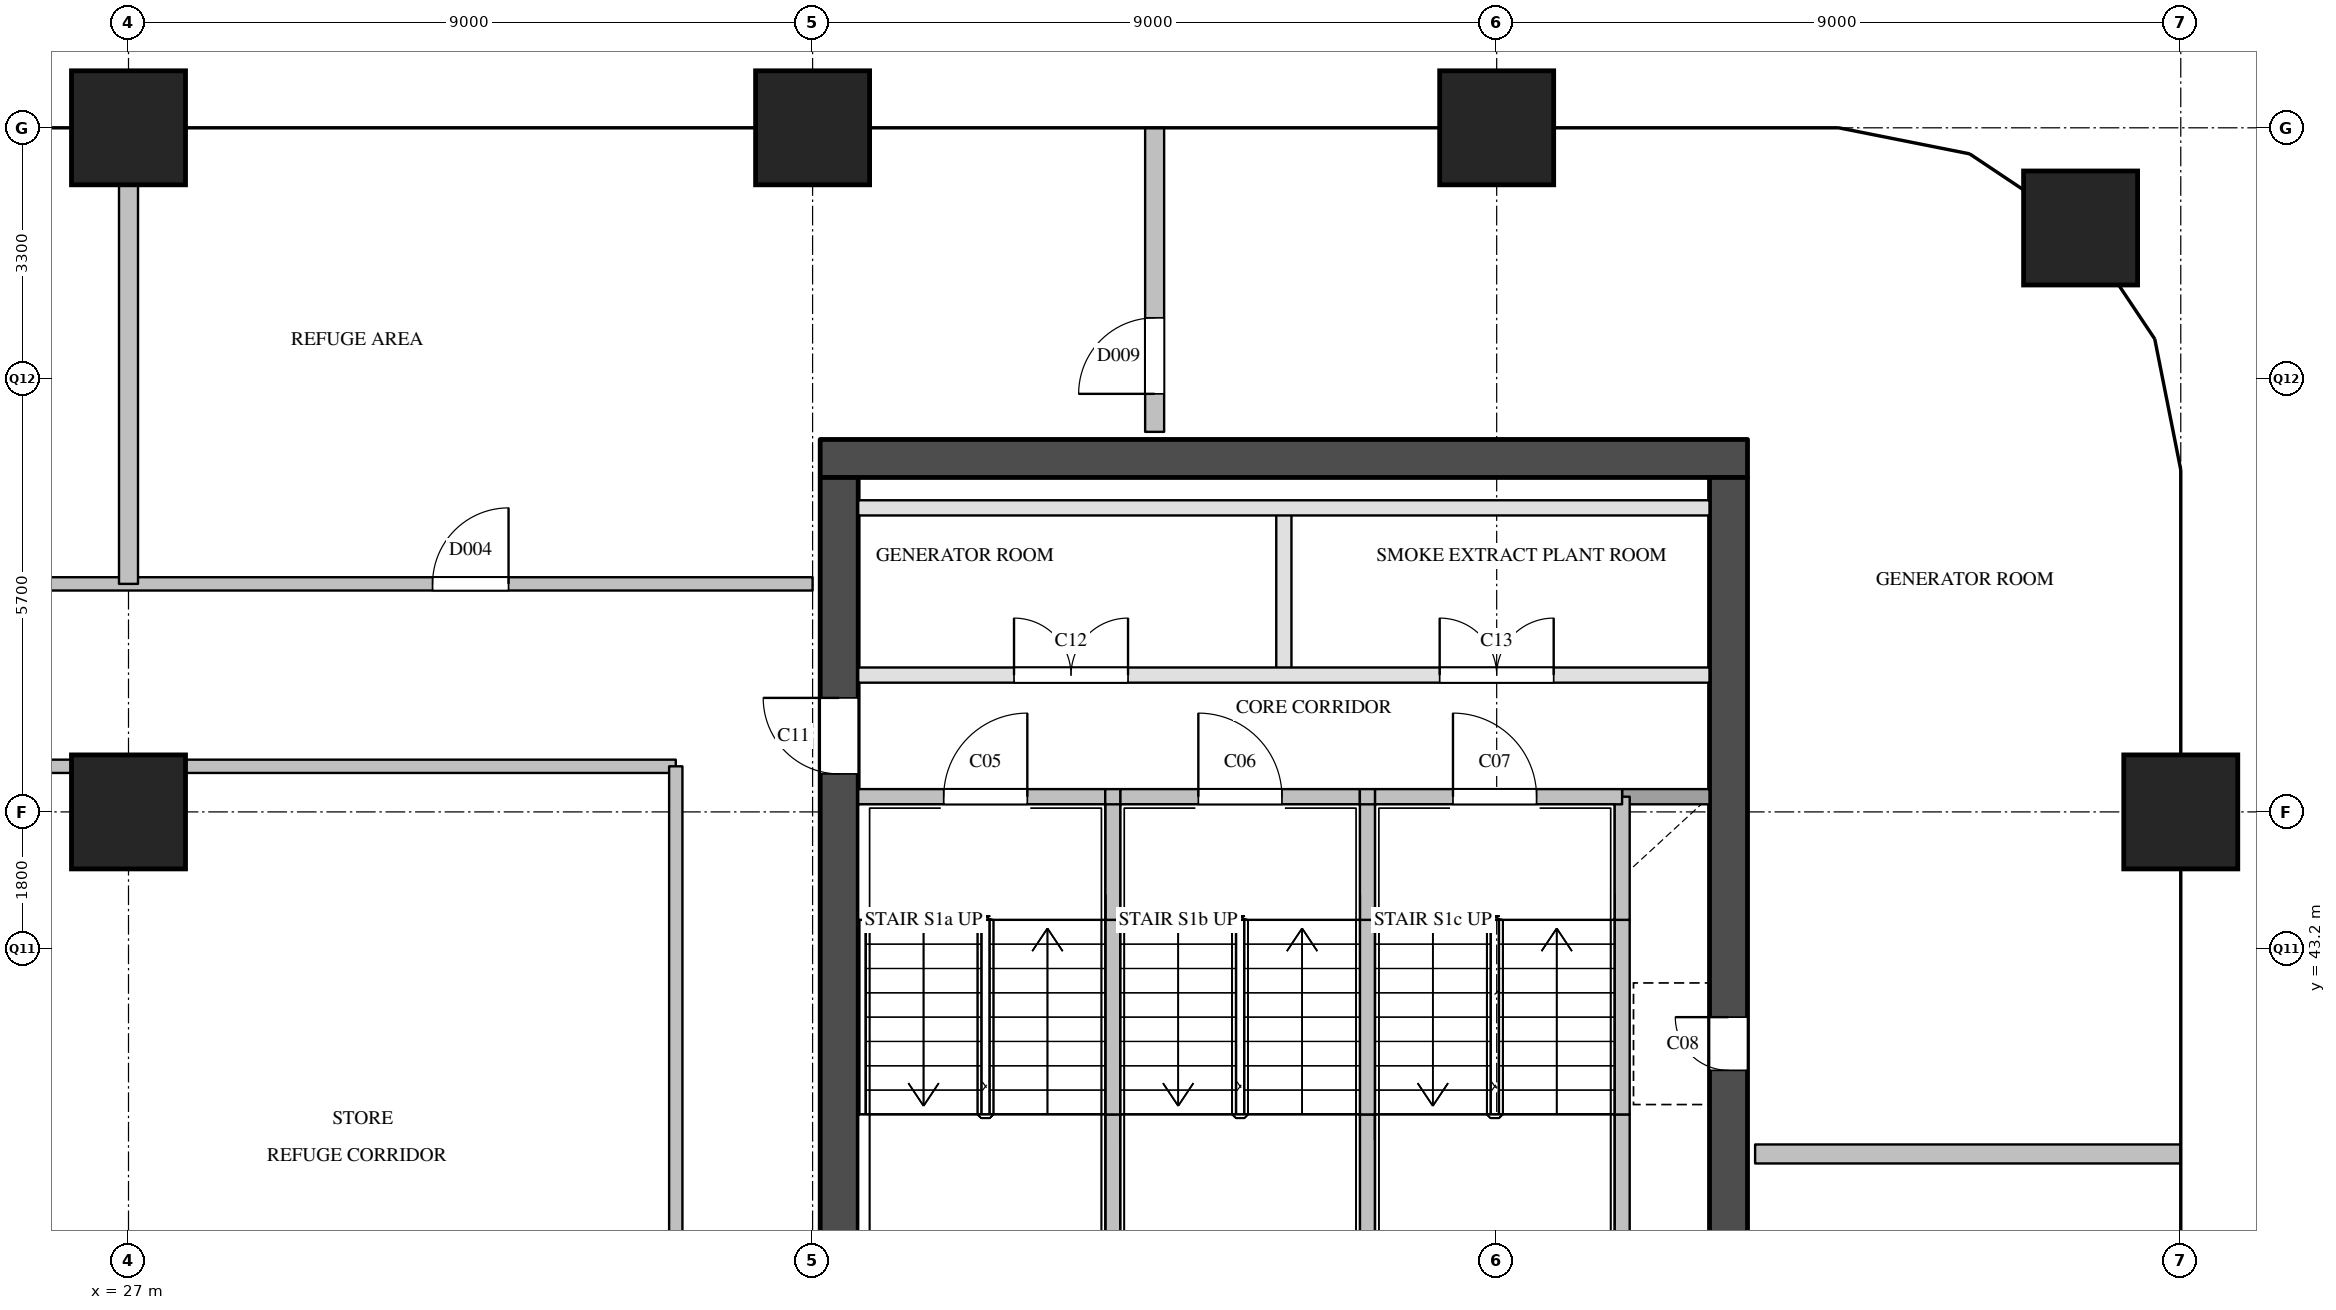
"""IFC4 building model, lengths in metres.
Left out: names, types, materials, properties, quantities, classifications, styles, units other than length and angle.
Written with IfcOpenShell. Run it as: python <this file> out.ifc"""

import sys

from ifc_helpers import new_model, si_unit, direction, frame, frame_2d, origin, origin_2d, place, context, subcontext, project, spatial, rectangle, extrude, element, fill, save


model = new_model("IFC4")
c1 = context("Model", 3, precision=1e-05, world=origin(), true_north=direction((0.0, 1.0)))
c2 = subcontext(c1, "Body", "Model", "MODEL_VIEW")
j1 = project(units=[si_unit("LENGTHUNIT", "METRE"), si_unit("PLANEANGLEUNIT", "RADIAN")], contexts=[c1])
p1 = place(None, origin())
s1 = spatial("IfcSite", under=j1, at=p1, CompositionType="ELEMENT")
p2 = place(p1, origin())
s2 = spatial("IfcBuilding", under=s1, at=p2, CompositionType="ELEMENT")
p3 = place(p2, frame((0.0, 0.0, 197.3)))
s3 = spatial("IfcBuildingStorey", under=s2, at=p3, CompositionType="ELEMENT", Elevation=197.3)
for number, where, z_axis, x_axis in (
    (1, (27.0, 45.0, 0.0), (0.0, 0.0, 1.0), (1.0, 0.0, 0.0)),
    (2, (27.0, 54.0, 0.0), (0.0, 0.0, 1.0), (1.0, 0.0, 0.0)),
    (3, (36.0, 54.0, 0.0), (0.0, 0.0, 1.0), (1.0, 0.0, 0.0)),
    (4, (45.0, 54.0, 0.0), (0.0, 0.0, 1.0), (1.0, 0.0, 0.0)),
    (5, (54.0, 45.0, 0.0), (0.0, 0.0, 1.0), (1.0, 0.0, 0.0)),
    (6, (52.682, 52.682, 0.0), (0.0, 0.0, 1.0), (1.0, 0.0, 0.0)),
):
    element("IfcColumn", number, at=place(p3, frame(where, z_axis=z_axis, x_axis=x_axis)), inside=s3, PredefinedType="COLUMN", context=c2, shape_type="SweptSolid", body=[
        extrude(rectangle(XDim=1.5, YDim=1.5, at=origin_2d()), origin(), (0.0, 0.0, 1.0), 6.0),
    ])
p4 = place(p3, frame((36.1, 49.65, 0.0), z_axis=(0.0, 0.0, 1.0), x_axis=(1.0, 0.0, 0.0)))
e7 = element("IfcWall", 7, at=p4, inside=s3, PredefinedType="SHEAR", context=c2, shape_type="SweptSolid", body=[
    extrude(rectangle(XDim=12.2, YDim=0.5, at=frame_2d((6.1, 0.0))), origin(), (0.0, 0.0, 1.0), 5.7),
])
p5 = place(p3, frame((36.35, 29.1, 0.0), z_axis=(0.0, 0.0, 1.0), x_axis=(0.0, 1.0, 0.0)))
e8 = element("IfcWall", 8, at=p5, inside=s3, PredefinedType="SHEAR", context=c2, shape_type="SweptSolid", body=[
    extrude(rectangle(XDim=20.3, YDim=0.5, at=frame_2d((10.15, 0.0))), origin(), (0.0, 0.0, 1.0), 5.7),
])
p6 = place(p5, frame((3.6, 0.0, 0.0)))
e9 = element("IfcOpeningElement", 9, at=p6, cuts=e8, PredefinedType="OPENING", context=c2, shape_type="SweptSolid", body=[
    extrude(rectangle(XDim=1.8, YDim=2.1, at=frame_2d((0.9, 1.05))), frame((0.0, 0.26, 0.0), z_axis=(0.0, -1.0, 0.0), x_axis=(1.0, 0.0, 0.0)), (0.0, 0.0, 1.0), 0.52),
])
p7 = place(p5, frame((16.4, 0.0, 0.0)))
e10 = element("IfcOpeningElement", 10, at=p7, cuts=e8, PredefinedType="OPENING", context=c2, shape_type="SweptSolid", body=[
    extrude(rectangle(XDim=1.0, YDim=2.1, at=frame_2d((0.5, 1.05))), frame((0.0, 0.26, 0.0), z_axis=(0.0, -1.0, 0.0), x_axis=(1.0, 0.0, 0.0)), (0.0, 0.0, 1.0), 0.52),
])
p8 = place(p3, frame((48.05, 29.1, 0.0), z_axis=(0.0, 0.0, 1.0), x_axis=(0.0, 1.0, 0.0)))
e11 = element("IfcWall", 11, at=p8, inside=s3, PredefinedType="SHEAR", context=c2, shape_type="SweptSolid", body=[
    extrude(rectangle(XDim=20.3, YDim=0.5, at=frame_2d((10.15, 0.0))), origin(), (0.0, 0.0, 1.0), 5.7),
])
p9 = place(p8, frame((12.5, 0.0, 0.0)))
e12 = element("IfcOpeningElement", 12, at=p9, cuts=e11, PredefinedType="OPENING", context=c2, shape_type="SweptSolid", body=[
    extrude(rectangle(XDim=0.7, YDim=2.1, at=frame_2d((0.35, 1.05))), frame((0.0, 0.26, 0.0), z_axis=(0.0, -1.0, 0.0), x_axis=(1.0, 0.0, 0.0)), (0.0, 0.0, 1.0), 0.52),
])
p10 = place(p3, frame((39.95, 39.0, 0.0), z_axis=(0.0, 0.0, 1.0), x_axis=(0.0, 1.0, 0.0)))
e13 = element("IfcWall", 13, at=p10, inside=s3, PredefinedType="SOLIDWALL", context=c2, shape_type="SweptSolid", body=[
    extrude(rectangle(XDim=2.02, YDim=0.2, at=frame_2d((1.01, 0.0))), origin(), (0.0, 0.0, 1.0), 5.7),
])
p11 = place(p3, frame((39.95, 41.02, 0.0), z_axis=(0.0, 0.0, 1.0), x_axis=(0.0, 1.0, 0.0)))
e14 = element("IfcWall", 14, at=p11, inside=s3, PredefinedType="SOLIDWALL", context=c2, shape_type="SweptSolid", body=[
    extrude(rectangle(XDim=2.56, YDim=0.2, at=frame_2d((1.28, 0.0))), origin(), (0.0, 0.0, 1.0), 5.7),
])
p12 = place(p3, frame((39.95, 43.58, 0.0), z_axis=(0.0, 0.0, 1.0), x_axis=(0.0, 1.0, 0.0)))
e15 = element("IfcWall", 15, at=p12, inside=s3, PredefinedType="SOLIDWALL", context=c2, shape_type="SweptSolid", body=[
    extrude(rectangle(XDim=1.62, YDim=0.2, at=frame_2d((0.81, 0.0))), origin(), (0.0, 0.0, 1.0), 5.7),
])
p13 = place(p3, frame((42.2, 46.8, 0.0), z_axis=(0.0, 0.0, 1.0), x_axis=(0.0, 1.0, 0.0)))
e16 = element("IfcWall", 16, at=p13, inside=s3, PredefinedType="PARTITIONING", context=c2, shape_type="SweptSolid", body=[
    extrude(rectangle(XDim=2.2, YDim=0.2, at=frame_2d((1.1, 0.0))), origin(), (0.0, 0.0, 1.0), 5.7),
])
p14 = place(p3, frame((43.3, 39.0, 0.0), z_axis=(0.0, 0.0, 1.0), x_axis=(0.0, 1.0, 0.0)))
e17 = element("IfcWall", 17, at=p14, inside=s3, PredefinedType="SOLIDWALL", context=c2, shape_type="SweptSolid", body=[
    extrude(rectangle(XDim=2.02, YDim=0.2, at=frame_2d((1.01, 0.0))), origin(), (0.0, 0.0, 1.0), 5.7),
])
p15 = place(p3, frame((43.3, 41.02, 0.0), z_axis=(0.0, 0.0, 1.0), x_axis=(0.0, 1.0, 0.0)))
e18 = element("IfcWall", 18, at=p15, inside=s3, PredefinedType="SOLIDWALL", context=c2, shape_type="SweptSolid", body=[
    extrude(rectangle(XDim=2.56, YDim=0.2, at=frame_2d((1.28, 0.0))), origin(), (0.0, 0.0, 1.0), 5.7),
])
p16 = place(p3, frame((43.3, 43.58, 0.0), z_axis=(0.0, 0.0, 1.0), x_axis=(0.0, 1.0, 0.0)))
e19 = element("IfcWall", 19, at=p16, inside=s3, PredefinedType="SOLIDWALL", context=c2, shape_type="SweptSolid", body=[
    extrude(rectangle(XDim=1.62, YDim=0.2, at=frame_2d((0.81, 0.0))), origin(), (0.0, 0.0, 1.0), 5.7),
])
p17 = place(p3, frame((46.65, 39.0, 0.0), z_axis=(0.0, 0.0, 1.0), x_axis=(0.0, 1.0, 0.0)))
e20 = element("IfcWall", 20, at=p17, inside=s3, PredefinedType="SOLIDWALL", context=c2, shape_type="SweptSolid", body=[
    extrude(rectangle(XDim=2.02, YDim=0.2, at=frame_2d((1.01, 0.0))), origin(), (0.0, 0.0, 1.0), 5.7),
])
p18 = place(p3, frame((46.65, 41.02, 0.0), z_axis=(0.0, 0.0, 1.0), x_axis=(0.0, 1.0, 0.0)))
e21 = element("IfcWall", 21, at=p18, inside=s3, PredefinedType="SOLIDWALL", context=c2, shape_type="SweptSolid", body=[
    extrude(rectangle(XDim=2.56, YDim=0.2, at=frame_2d((1.28, 0.0))), origin(), (0.0, 0.0, 1.0), 5.7),
])
p19 = place(p3, frame((46.65, 43.58, 0.0), z_axis=(0.0, 0.0, 1.0), x_axis=(0.0, 1.0, 0.0)))
e22 = element("IfcWall", 22, at=p19, inside=s3, PredefinedType="SOLIDWALL", context=c2, shape_type="SweptSolid", body=[
    extrude(rectangle(XDim=1.62, YDim=0.2, at=frame_2d((0.81, 0.0))), origin(), (0.0, 0.0, 1.0), 5.7),
])
p20 = place(p3, frame((46.65, 45.2, 0.0), z_axis=(0.0, 0.0, 1.0), x_axis=(1.0, 0.0, 0.0)))
e23 = element("IfcWall", 23, at=p20, inside=s3, PredefinedType="SOLIDWALL", context=c2, shape_type="SweptSolid", body=[
    extrude(rectangle(XDim=1.15, YDim=0.2, at=frame_2d((0.575, 0.0))), origin(), (0.0, 0.0, 1.0), 5.7),
])
p21 = place(p3, frame((36.6, 45.2, 0.0), z_axis=(0.0, 0.0, 1.0), x_axis=(1.0, 0.0, 0.0)))
e24 = element("IfcWall", 24, at=p21, inside=s3, PredefinedType="SOLIDWALL", context=c2, shape_type="SweptSolid", body=[
    extrude(rectangle(XDim=3.25, YDim=0.2, at=frame_2d((1.625, 0.0))), origin(), (0.0, 0.0, 1.0), 5.7),
])
p22 = place(p21, frame((1.125, 0.0, 0.0)))
e25 = element("IfcOpeningElement", 25, at=p22, cuts=e24, PredefinedType="OPENING", context=c2, shape_type="SweptSolid", body=[
    extrude(rectangle(XDim=1.1, YDim=2.1, at=frame_2d((0.55, 1.05))), frame((0.0, 0.11, 0.0), z_axis=(0.0, -1.0, 0.0), x_axis=(1.0, 0.0, 0.0)), (0.0, 0.0, 1.0), 0.22),
])
p23 = place(p3, frame((39.85, 45.2, 0.0), z_axis=(0.0, 0.0, 1.0), x_axis=(1.0, 0.0, 0.0)))
e26 = element("IfcWall", 26, at=p23, inside=s3, PredefinedType="SOLIDWALL", context=c2, shape_type="SweptSolid", body=[
    extrude(rectangle(XDim=0.2, YDim=0.2, at=frame_2d((0.1, 0.0))), origin(), (0.0, 0.0, 1.0), 5.7),
])
p24 = place(p3, frame((40.05, 45.2, 0.0), z_axis=(0.0, 0.0, 1.0), x_axis=(1.0, 0.0, 0.0)))
e27 = element("IfcWall", 27, at=p24, inside=s3, PredefinedType="SOLIDWALL", context=c2, shape_type="SweptSolid", body=[
    extrude(rectangle(XDim=3.15, YDim=0.2, at=frame_2d((1.575, 0.0))), origin(), (0.0, 0.0, 1.0), 5.7),
])
p25 = place(p24, frame((1.025, 0.0, 0.0)))
e28 = element("IfcOpeningElement", 28, at=p25, cuts=e27, PredefinedType="OPENING", context=c2, shape_type="SweptSolid", body=[
    extrude(rectangle(XDim=1.1, YDim=2.1, at=frame_2d((0.55, 1.05))), frame((0.0, 0.11, 0.0), z_axis=(0.0, -1.0, 0.0), x_axis=(1.0, 0.0, 0.0)), (0.0, 0.0, 1.0), 0.22),
])
p26 = place(p3, frame((43.2, 45.2, 0.0), z_axis=(0.0, 0.0, 1.0), x_axis=(1.0, 0.0, 0.0)))
e29 = element("IfcWall", 29, at=p26, inside=s3, PredefinedType="SOLIDWALL", context=c2, shape_type="SweptSolid", body=[
    extrude(rectangle(XDim=0.2, YDim=0.2, at=frame_2d((0.1, 0.0))), origin(), (0.0, 0.0, 1.0), 5.7),
])
p27 = place(p3, frame((43.4, 45.2, 0.0), z_axis=(0.0, 0.0, 1.0), x_axis=(1.0, 0.0, 0.0)))
e30 = element("IfcWall", 30, at=p27, inside=s3, PredefinedType="SOLIDWALL", context=c2, shape_type="SweptSolid", body=[
    extrude(rectangle(XDim=3.25, YDim=0.2, at=frame_2d((1.625, 0.0))), origin(), (0.0, 0.0, 1.0), 5.7),
])
p28 = place(p27, frame((1.025, 0.0, 0.0)))
e31 = element("IfcOpeningElement", 31, at=p28, cuts=e30, PredefinedType="OPENING", context=c2, shape_type="SweptSolid", body=[
    extrude(rectangle(XDim=1.1, YDim=2.1, at=frame_2d((0.55, 1.05))), frame((0.0, 0.11, 0.0), z_axis=(0.0, -1.0, 0.0), x_axis=(1.0, 0.0, 0.0)), (0.0, 0.0, 1.0), 0.22),
])
p29 = place(p3, frame((36.6, 46.8, 0.0), z_axis=(0.0, 0.0, 1.0), x_axis=(1.0, 0.0, 0.0)))
e32 = element("IfcWall", 32, at=p29, inside=s3, PredefinedType="PARTITIONING", context=c2, shape_type="SweptSolid", body=[
    extrude(rectangle(XDim=11.2, YDim=0.2, at=frame_2d((5.6, 0.0))), origin(), (0.0, 0.0, 1.0), 5.7),
])
p30 = place(p29, frame((2.05, 0.0, 0.0)))
e33 = element("IfcOpeningElement", 33, at=p30, cuts=e32, PredefinedType="OPENING", context=c2, shape_type="SweptSolid", body=[
    extrude(rectangle(XDim=1.5, YDim=2.1, at=frame_2d((0.75, 1.05))), frame((0.0, 0.11, 0.0), z_axis=(0.0, -1.0, 0.0), x_axis=(1.0, 0.0, 0.0)), (0.0, 0.0, 1.0), 0.22),
])
p31 = place(p29, frame((7.65, 0.0, 0.0)))
e34 = element("IfcOpeningElement", 34, at=p31, cuts=e32, PredefinedType="OPENING", context=c2, shape_type="SweptSolid", body=[
    extrude(rectangle(XDim=1.5, YDim=2.1, at=frame_2d((0.75, 1.05))), frame((0.0, 0.11, 0.0), z_axis=(0.0, -1.0, 0.0), x_axis=(1.0, 0.0, 0.0)), (0.0, 0.0, 1.0), 0.22),
])
p32 = place(p3, frame((36.6, 49.0, 0.0), z_axis=(0.0, 0.0, 1.0), x_axis=(1.0, 0.0, 0.0)))
e35 = element("IfcWall", 35, at=p32, inside=s3, PredefinedType="PARTITIONING", context=c2, shape_type="SweptSolid", body=[
    extrude(rectangle(XDim=11.2, YDim=0.2, at=frame_2d((5.6, 0.0))), origin(), (0.0, 0.0, 1.0), 5.7),
])
p33 = place(p3, frame((19.8, 45.6, 0.0), z_axis=(0.0, 0.0, 1.0), x_axis=(1.0, 0.0, 0.0)))
e36 = element("IfcWall", 36, at=p33, inside=s3, PredefinedType="PARTITIONING", context=c2, shape_type="SweptSolid", body=[
    extrude(rectangle(XDim=14.4, YDim=0.175, at=frame_2d((7.2, 0.0))), origin(), (0.0, 0.0, 1.0), 5.7),
])
p34 = place(p3, frame((18.0, 48.0, 0.0), z_axis=(0.0, 0.0, 1.0), x_axis=(1.0, 0.0, 0.0)))
e37 = element("IfcWall", 37, at=p34, inside=s3, PredefinedType="PARTITIONING", context=c2, shape_type="SweptSolid", body=[
    extrude(rectangle(XDim=18.0, YDim=0.175, at=frame_2d((9.0, 0.0))), origin(), (0.0, 0.0, 1.0), 5.7),
])
p35 = place(p34, frame((4.0, 0.0, 0.0)))
e38 = element("IfcOpeningElement", 38, at=p35, cuts=e37, PredefinedType="OPENING", context=c2, shape_type="SweptSolid", body=[
    extrude(rectangle(XDim=1.0, YDim=2.1, at=frame_2d((0.5, 1.05))), frame((0.0, 0.097, 0.0), z_axis=(0.0, -1.0, 0.0), x_axis=(1.0, 0.0, 0.0)), (0.0, 0.0, 1.0), 0.195),
])
p36 = place(p34, frame((13.0, 0.0, 0.0)))
e39 = element("IfcOpeningElement", 39, at=p36, cuts=e37, PredefinedType="OPENING", context=c2, shape_type="SweptSolid", body=[
    extrude(rectangle(XDim=1.0, YDim=2.1, at=frame_2d((0.5, 1.05))), frame((0.0, 0.097, 0.0), z_axis=(0.0, -1.0, 0.0), x_axis=(1.0, 0.0, 0.0)), (0.0, 0.0, 1.0), 0.195),
])
p37 = place(p3, frame((34.2, 35.4, 0.0), z_axis=(0.0, 0.0, 1.0), x_axis=(0.0, 1.0, 0.0)))
e40 = element("IfcWall", 40, at=p37, inside=s3, PredefinedType="PARTITIONING", context=c2, shape_type="SweptSolid", body=[
    extrude(rectangle(XDim=10.2, YDim=0.175, at=frame_2d((5.1, 0.0))), origin(), (0.0, 0.0, 1.0), 4.59),
])
p38 = place(p3, frame((48.4, 40.5, 0.0), z_axis=(0.0, 0.0, 1.0), x_axis=(1.0, 0.0, 0.0)))
e41 = element("IfcWall", 41, at=p38, inside=s3, PredefinedType="PARTITIONING", context=c2, shape_type="SweptSolid", body=[
    extrude(rectangle(XDim=5.6, YDim=0.25, at=frame_2d((2.8, 0.0))), origin(), (0.0, 0.0, 1.0), 5.7),
])
p39 = place(p3, frame((27.0, 48.0, 0.0), z_axis=(0.0, 0.0, 1.0), x_axis=(0.0, 1.0, 0.0)))
e42 = element("IfcWall", 42, at=p39, inside=s3, PredefinedType="PARTITIONING", context=c2, shape_type="SweptSolid", body=[
    extrude(rectangle(XDim=6.0, YDim=0.25, at=frame_2d((3.0, 0.0))), origin(), (0.0, 0.0, 1.0), 5.7),
])
p40 = place(p3, frame((40.5, 50.0, 0.0), z_axis=(0.0, 0.0, 1.0), x_axis=(0.0, 1.0, 0.0)))
e43 = element("IfcWall", 43, at=p40, inside=s3, PredefinedType="PARTITIONING", context=c2, shape_type="SweptSolid", body=[
    extrude(rectangle(XDim=4.0, YDim=0.25, at=frame_2d((2.0, 0.0))), origin(), (0.0, 0.0, 1.0), 5.7),
])
p41 = place(p40, frame((0.5, 0.0, 0.0)))
e44 = element("IfcOpeningElement", 44, at=p41, cuts=e43, PredefinedType="OPENING", context=c2, shape_type="SweptSolid", body=[
    extrude(rectangle(XDim=1.0, YDim=2.1, at=frame_2d((0.5, 1.05))), frame((0.0, 0.135, 0.0), z_axis=(0.0, -1.0, 0.0), x_axis=(1.0, 0.0, 0.0)), (0.0, 0.0, 1.0), 0.27),
])
p42 = place(p22, origin())
e45 = element("IfcDoor", 45, at=p42, inside=s3, OperationType="SINGLE_SWING_RIGHT", PredefinedType="DOOR", context=c2, shape_type="SweptSolid", body=[
    extrude(rectangle(XDim=1.1, YDim=2.1, at=frame_2d((0.55, 1.05))), frame((0.0, 0.025, 0.0), z_axis=(0.0, -1.0, 0.0), x_axis=(1.0, 0.0, 0.0)), (0.0, 0.0, 1.0), 0.05),
])
fill(e25, e45)
p43 = place(p25, origin())
e46 = element("IfcDoor", 46, at=p43, inside=s3, OperationType="SINGLE_SWING_LEFT", PredefinedType="DOOR", context=c2, shape_type="SweptSolid", body=[
    extrude(rectangle(XDim=1.1, YDim=2.1, at=frame_2d((0.55, 1.05))), frame((0.0, 0.025, 0.0), z_axis=(0.0, -1.0, 0.0), x_axis=(1.0, 0.0, 0.0)), (0.0, 0.0, 1.0), 0.05),
])
fill(e28, e46)
p44 = place(p28, origin())
e47 = element("IfcDoor", 47, at=p44, inside=s3, OperationType="SINGLE_SWING_LEFT", PredefinedType="DOOR", context=c2, shape_type="SweptSolid", body=[
    extrude(rectangle(XDim=1.1, YDim=2.1, at=frame_2d((0.55, 1.05))), frame((0.0, 0.025, 0.0), z_axis=(0.0, -1.0, 0.0), x_axis=(1.0, 0.0, 0.0)), (0.0, 0.0, 1.0), 0.05),
])
fill(e31, e47)
p45 = place(p9, origin())
e48 = element("IfcDoor", 48, at=p45, inside=s3, OperationType="SINGLE_SWING_RIGHT", PredefinedType="DOOR", context=c2, shape_type="SweptSolid", body=[
    extrude(rectangle(XDim=0.7, YDim=2.1, at=frame_2d((0.35, 1.05))), frame((0.0, 0.025, 0.0), z_axis=(0.0, -1.0, 0.0), x_axis=(1.0, 0.0, 0.0)), (0.0, 0.0, 1.0), 0.05),
])
fill(e12, e48)
p46 = place(p7, origin())
e49 = element("IfcDoor", 49, at=p46, inside=s3, OperationType="SINGLE_SWING_RIGHT", PredefinedType="DOOR", context=c2, shape_type="SweptSolid", body=[
    extrude(rectangle(XDim=1.0, YDim=2.1, at=frame_2d((0.5, 1.05))), frame((0.0, 0.025, 0.0), z_axis=(0.0, -1.0, 0.0), x_axis=(1.0, 0.0, 0.0)), (0.0, 0.0, 1.0), 0.05),
])
fill(e10, e49)
p47 = place(p30, origin())
e50 = element("IfcDoor", 50, at=p47, inside=s3, OperationType="DOUBLE_DOOR_SINGLE_SWING", PredefinedType="DOOR", context=c2, shape_type="SweptSolid", body=[
    extrude(rectangle(XDim=1.5, YDim=2.1, at=frame_2d((0.75, 1.05))), frame((0.0, 0.025, 0.0), z_axis=(0.0, -1.0, 0.0), x_axis=(1.0, 0.0, 0.0)), (0.0, 0.0, 1.0), 0.05),
])
fill(e33, e50)
p48 = place(p31, origin())
e51 = element("IfcDoor", 51, at=p48, inside=s3, OperationType="DOUBLE_DOOR_SINGLE_SWING", PredefinedType="DOOR", context=c2, shape_type="SweptSolid", body=[
    extrude(rectangle(XDim=1.5, YDim=2.1, at=frame_2d((0.75, 1.05))), frame((0.0, 0.025, 0.0), z_axis=(0.0, -1.0, 0.0), x_axis=(1.0, 0.0, 0.0)), (0.0, 0.0, 1.0), 0.05),
])
fill(e34, e51)
p49 = place(p36, origin())
e52 = element("IfcDoor", 52, at=p49, inside=s3, OperationType="SINGLE_SWING_RIGHT", PredefinedType="DOOR", context=c2, shape_type="SweptSolid", body=[
    extrude(rectangle(XDim=1.0, YDim=2.1, at=frame_2d((0.5, 1.05))), frame((0.0, 0.025, 0.0), z_axis=(0.0, -1.0, 0.0), x_axis=(1.0, 0.0, 0.0)), (0.0, 0.0, 1.0), 0.05),
])
fill(e39, e52)
p50 = place(p41, origin())
e53 = element("IfcDoor", 53, at=p50, inside=s3, OperationType="SINGLE_SWING_LEFT", PredefinedType="DOOR", context=c2, shape_type="SweptSolid", body=[
    extrude(rectangle(XDim=1.0, YDim=2.1, at=frame_2d((0.5, 1.05))), frame((0.0, 0.025, 0.0), z_axis=(0.0, -1.0, 0.0), x_axis=(1.0, 0.0, 0.0)), (0.0, 0.0, 1.0), 0.05),
])
fill(e44, e53)
save(model, sys.argv[1])
